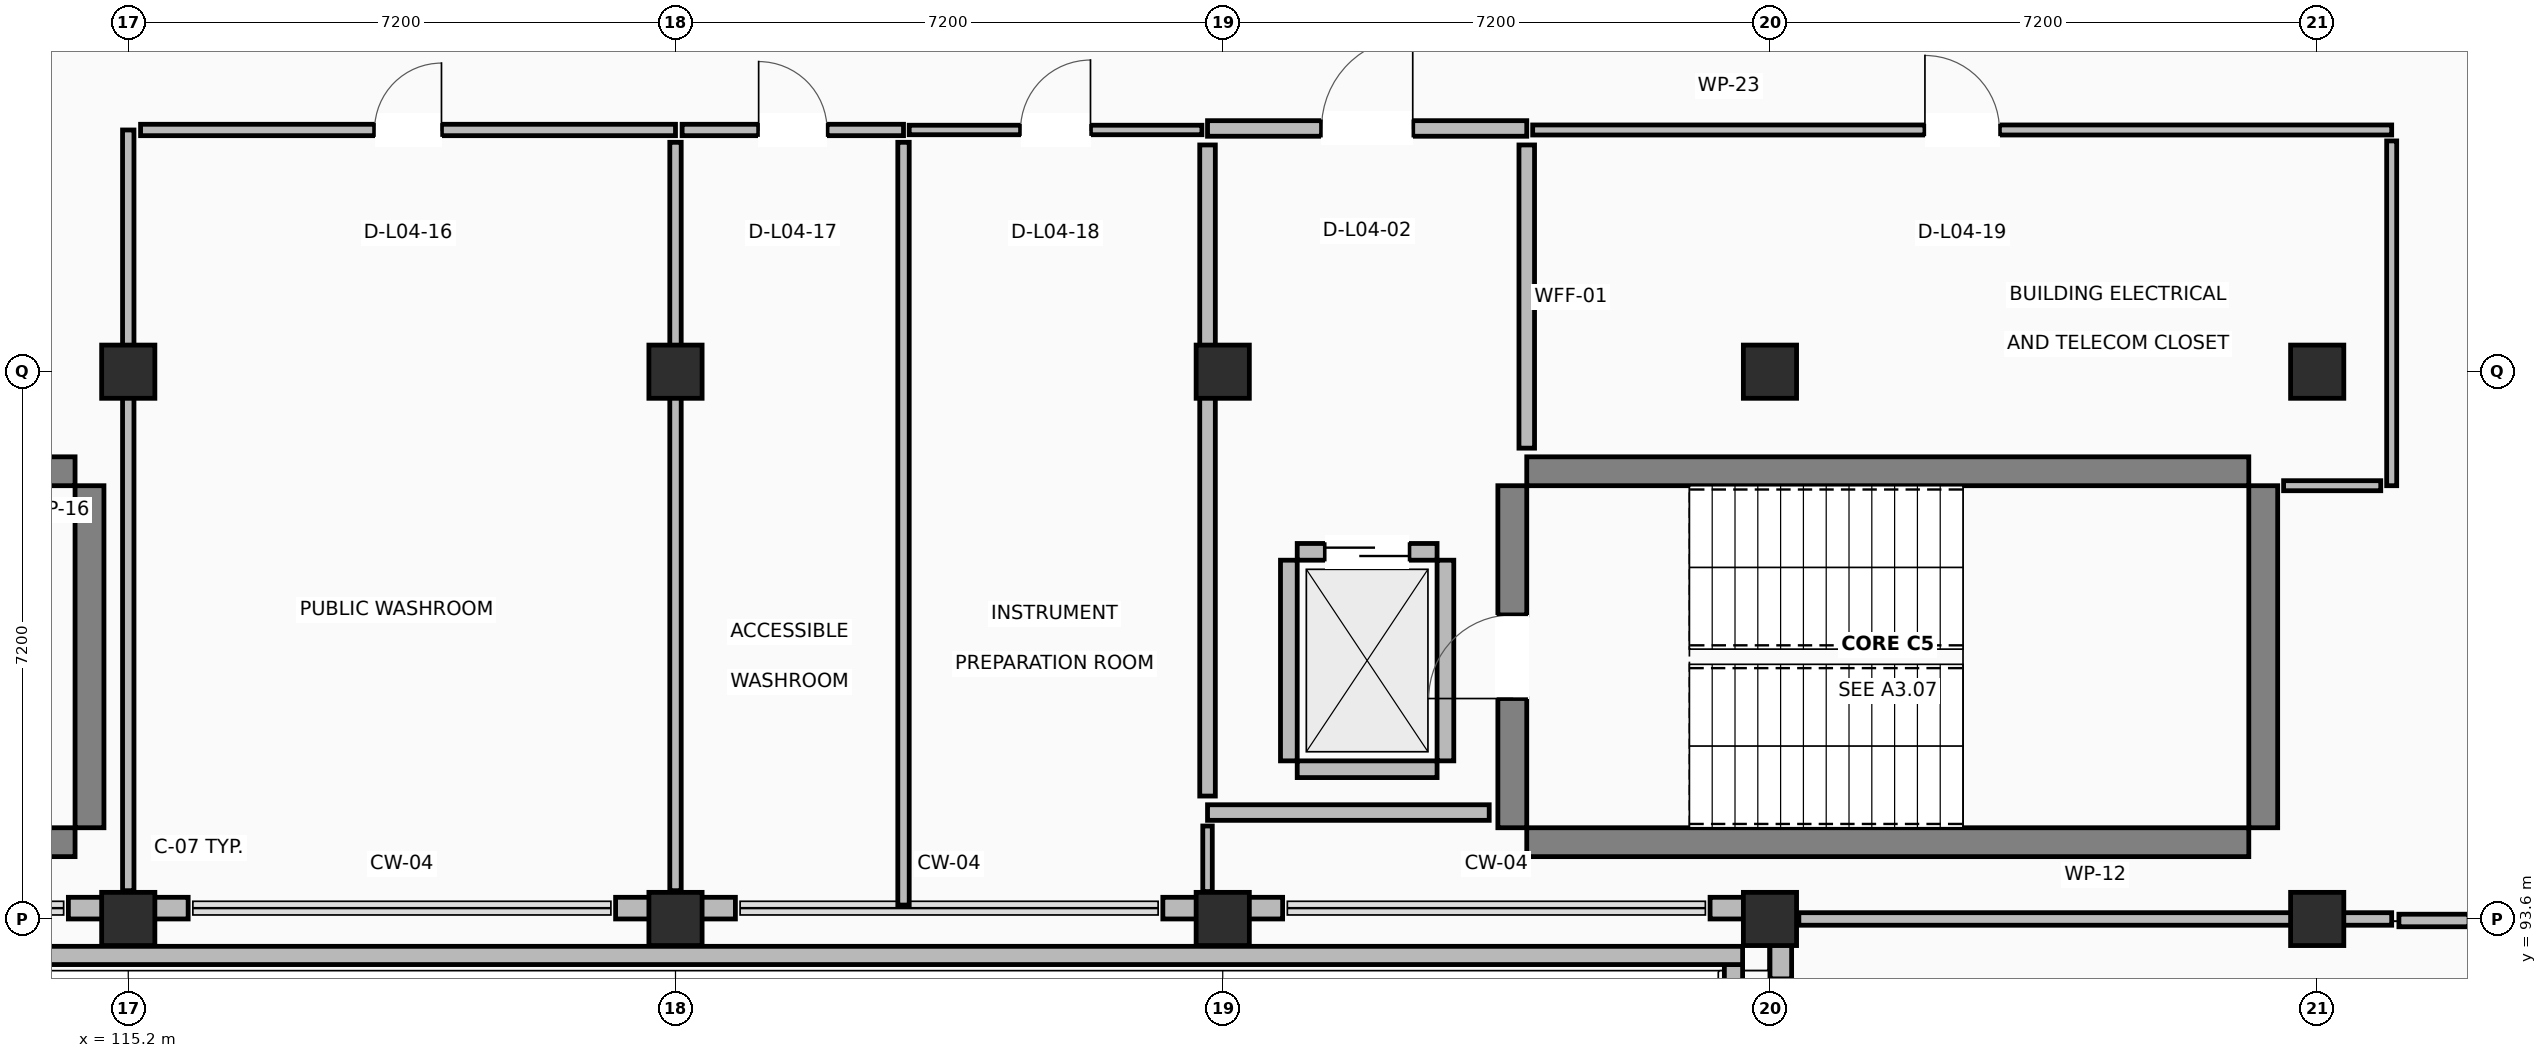
"""IFC4 building model, lengths in metres.
Left out: names, types, materials, properties, quantities, classifications, styles, units other than length and angle.
Written with IfcOpenShell. Run it as: python <this file> out.ifc"""

import sys

from ifc_helpers import new_model, si_unit, direction, frame, frame_2d, origin, origin_2d, place, context, subcontext, project, spatial, rectangle, extrude, element, fill, save


model = new_model("IFC4")
c1 = context("Model", 3, precision=1e-05, world=origin(), true_north=direction((0.0, 1.0)))
c2 = subcontext(c1, "Body", "Model", "MODEL_VIEW")
j1 = project(units=[si_unit("LENGTHUNIT", "METRE"), si_unit("PLANEANGLEUNIT", "RADIAN")], contexts=[c1])
p1 = place(None, origin())
s1 = spatial("IfcSite", under=j1, at=p1, CompositionType="ELEMENT")
p2 = place(p1, origin())
s2 = spatial("IfcBuilding", under=s1, at=p2, CompositionType="ELEMENT")
p3 = place(p2, frame((0.0, 0.0, 18.0)))
s3 = spatial("IfcBuildingStorey", under=s2, at=p3, CompositionType="ELEMENT", Elevation=18.0)
for number, where, z_axis, x_axis in (
    (1, (115.2, 93.6, 0.0), (0.0, 0.0, 1.0), (1.0, 0.0, 0.0)),
    (2, (115.2, 100.8, 0.0), (0.0, 0.0, 1.0), (1.0, 0.0, 0.0)),
    (3, (122.4, 93.6, 0.0), (0.0, 0.0, 1.0), (1.0, 0.0, 0.0)),
    (4, (122.4, 100.8, 0.0), (0.0, 0.0, 1.0), (1.0, 0.0, 0.0)),
    (5, (129.6, 93.6, 0.0), (0.0, 0.0, 1.0), (1.0, 0.0, 0.0)),
    (6, (129.6, 100.8, 0.0), (0.0, 0.0, 1.0), (1.0, 0.0, 0.0)),
    (7, (136.8, 93.6, 0.0), (0.0, 0.0, 1.0), (1.0, 0.0, 0.0)),
    (8, (136.8, 100.8, 0.0), (0.0, 0.0, 1.0), (1.0, 0.0, 0.0)),
    (9, (144.0, 93.6, 0.0), (0.0, 0.0, 1.0), (1.0, 0.0, 0.0)),
    (10, (144.0, 100.8, 0.0), (0.0, 0.0, 1.0), (1.0, 0.0, 0.0)),
):
    element("IfcColumn", number, at=place(p3, frame(where, z_axis=z_axis, x_axis=x_axis)), inside=s3, PredefinedType="COLUMN", context=c2, shape_type="SweptSolid", body=[
        extrude(rectangle(XDim=0.7, YDim=0.7, at=origin_2d()), origin(), (0.0, 0.0, 1.0), 4.22),
    ])
for number, where, z_axis, x_axis in (
    (11, (105.0, 94.61, 0.0), (0.0, 0.0, 1.0), (1.0, 0.0, 0.0)),
    (12, (105.0, 99.49, 0.0), (0.0, 0.0, 1.0), (1.0, 0.0, 0.0)),
):
    element("IfcWall", number, at=place(p3, frame(where, z_axis=z_axis, x_axis=x_axis)), inside=s3, PredefinedType="SHEAR", context=c2, shape_type="SweptSolid", body=[
        extrude(rectangle(XDim=9.5, YDim=0.38, at=frame_2d((4.75, 0.0))), origin(), (0.0, 0.0, 1.0), 4.22),
    ])
p4 = place(p3, frame((114.69, 94.8, 0.0), z_axis=(0.0, 0.0, 1.0), x_axis=(0.0, 1.0, 0.0)))
e13 = element("IfcWall", 13, at=p4, inside=s3, PredefinedType="SHEAR", context=c2, shape_type="SweptSolid", body=[
    extrude(rectangle(XDim=4.5, YDim=0.38, at=frame_2d((2.25, 0.0))), origin(), (0.0, 0.0, 1.0), 4.22),
])
for number, where, z_axis, x_axis in (
    (14, (133.6, 94.61, 0.0), (0.0, 0.0, 1.0), (1.0, 0.0, 0.0)),
    (15, (133.6, 99.49, 0.0), (0.0, 0.0, 1.0), (1.0, 0.0, 0.0)),
):
    element("IfcWall", number, at=place(p3, frame(where, z_axis=z_axis, x_axis=x_axis)), inside=s3, PredefinedType="SHEAR", context=c2, shape_type="SweptSolid", body=[
        extrude(rectangle(XDim=9.5, YDim=0.38, at=frame_2d((4.75, 0.0))), origin(), (0.0, 0.0, 1.0), 4.22),
    ])
p5 = place(p3, frame((133.41, 94.8, 0.0), z_axis=(0.0, 0.0, 1.0), x_axis=(0.0, 1.0, 0.0)))
e16 = element("IfcWall", 16, at=p5, inside=s3, PredefinedType="SHEAR", context=c2, shape_type="SweptSolid", body=[
    extrude(rectangle(XDim=4.5, YDim=0.38, at=frame_2d((2.25, 0.0))), origin(), (0.0, 0.0, 1.0), 4.22),
])
p6 = place(p5, frame((1.7, 0.0, 0.0)))
e17 = element("IfcOpeningElement", 17, at=p6, cuts=e16, PredefinedType="OPENING", context=c2, shape_type="SweptSolid", body=[
    extrude(rectangle(XDim=1.1, YDim=2.15, at=frame_2d((0.55, 1.075))), frame((0.0, 0.2, 0.0), z_axis=(0.0, -1.0, 0.0), x_axis=(1.0, 0.0, 0.0)), (0.0, 0.0, 1.0), 0.4),
])
p7 = place(p3, frame((143.29, 94.8, 0.0), z_axis=(0.0, 0.0, 1.0), x_axis=(0.0, 1.0, 0.0)))
e18 = element("IfcWall", 18, at=p7, inside=s3, PredefinedType="SHEAR", context=c2, shape_type="SweptSolid", body=[
    extrude(rectangle(XDim=4.5, YDim=0.38, at=frame_2d((2.25, 0.0))), origin(), (0.0, 0.0, 1.0), 4.22),
])
for number, where, z_axis, x_axis in (
    (19, (114.412, 93.742, 0.0), (0.0, 0.0, 1.0), (1.0, 0.0, 0.0)),
    (20, (121.612, 93.742, 0.0), (0.0, 0.0, 1.0), (1.0, 0.0, 0.0)),
    (21, (128.812, 93.742, 0.0), (0.0, 0.0, 1.0), (1.0, 0.0, 0.0)),
):
    element("IfcWall", number, at=place(p3, frame(where, z_axis=z_axis, x_axis=x_axis)), inside=s3, PredefinedType="STANDARD", context=c2, shape_type="SweptSolid", body=[
        extrude(rectangle(XDim=1.576, YDim=0.285, at=frame_2d((0.788, 0.0))), origin(), (0.0, 0.0, 1.0), 3.26),
    ])
p8 = place(p3, frame((136.012, 93.742, 0.0), z_axis=(0.0, 0.0, 1.0), x_axis=(1.0, 0.0, 0.0)))
e22 = element("IfcWall", 22, at=p8, inside=s3, PredefinedType="STANDARD", context=c2, shape_type="SweptSolid", body=[
    extrude(rectangle(XDim=0.788, YDim=0.285, at=frame_2d((0.394, 0.0))), origin(), (0.0, 0.0, 1.0), 3.26),
])
p9 = place(p3, frame((136.942, 93.885, 0.0), z_axis=(0.0, 0.0, 1.0), x_axis=(0.0, -1.0, 0.0)))
e23 = element("IfcWall", 23, at=p9, inside=s3, PredefinedType="STANDARD", context=c2, shape_type="SweptSolid", body=[
    extrude(rectangle(XDim=1.073, YDim=0.285, at=frame_2d((0.537, 0.0))), origin(), (0.0, 0.0, 1.0), 3.26),
])
p10 = place(p3, frame((136.32, 86.04, 0.0), z_axis=(0.0, 0.0, 1.0), x_axis=(0.0, 1.0, 0.0)))
e24 = element("IfcWall", 24, at=p10, inside=s3, PredefinedType="PARAPET", context=c2, shape_type="SweptSolid", body=[
    extrude(rectangle(XDim=6.96, YDim=0.24, at=frame_2d((3.48, 0.0))), origin(), (0.0, 0.0, 1.0), 1.12),
])
p11 = place(p3, frame((136.44, 93.12, 0.0), z_axis=(0.0, 0.0, 1.0), x_axis=(-1.0, 0.0, 0.0)))
e25 = element("IfcWall", 25, at=p11, inside=s3, PredefinedType="PARAPET", context=c2, shape_type="SweptSolid", body=[
    extrude(rectangle(XDim=57.84, YDim=0.24, at=frame_2d((28.92, 0.0))), origin(), (0.0, 0.0, 1.0), 1.12),
])
p12 = place(p3, frame((130.58, 95.57, 0.0), z_axis=(0.0, 0.0, 1.0), x_axis=(1.0, 0.0, 0.0)))
e26 = element("IfcWall", 26, at=p12, inside=s3, PredefinedType="STANDARD", context=c2, shape_type="SweptSolid", body=[
    extrude(rectangle(XDim=1.84, YDim=0.22, at=frame_2d((0.92, 0.0))), origin(), (0.0, 0.0, 1.0), 3.26),
])
p13 = place(p3, frame((130.58, 98.43, 0.0), z_axis=(0.0, 0.0, 1.0), x_axis=(1.0, 0.0, 0.0)))
e27 = element("IfcWall", 27, at=p13, inside=s3, PredefinedType="STANDARD", context=c2, shape_type="SweptSolid", body=[
    extrude(rectangle(XDim=1.84, YDim=0.22, at=frame_2d((0.92, 0.0))), origin(), (0.0, 0.0, 1.0), 3.26),
])
p14 = place(p13, frame((0.37, 0.0, 0.0)))
e28 = element("IfcOpeningElement", 28, at=p14, cuts=e27, PredefinedType="OPENING", context=c2, shape_type="SweptSolid", body=[
    extrude(rectangle(XDim=1.1, YDim=2.15, at=frame_2d((0.55, 1.075))), frame((0.0, 0.12, 0.0), z_axis=(0.0, -1.0, 0.0), x_axis=(1.0, 0.0, 0.0)), (0.0, 0.0, 1.0), 0.24),
])
for number, where, z_axis, x_axis in (
    (29, (130.47, 95.68, 0.0), (0.0, 0.0, 1.0), (0.0, 1.0, 0.0)),
    (30, (132.53, 95.68, 0.0), (0.0, 0.0, 1.0), (0.0, 1.0, 0.0)),
):
    element("IfcWall", number, at=place(p3, frame(where, z_axis=z_axis, x_axis=x_axis)), inside=s3, PredefinedType="STANDARD", context=c2, shape_type="SweptSolid", body=[
        extrude(rectangle(XDim=2.64, YDim=0.22, at=frame_2d((1.32, 0.0))), origin(), (0.0, 0.0, 1.0), 3.26),
    ])
p15 = place(p3, frame((129.4, 104.0, 0.0), z_axis=(0.0, 0.0, 1.0), x_axis=(1.0, 0.0, 0.0)))
e31 = element("IfcWall", 31, at=p15, inside=s3, PredefinedType="PARTITIONING", context=c2, shape_type="SweptSolid", body=[
    extrude(rectangle(XDim=4.2, YDim=0.205, at=frame_2d((2.1, 0.0))), origin(), (0.0, 0.0, 1.0), 3.26),
])
p16 = place(p15, frame((1.5, 0.0, 0.0)))
e32 = element("IfcOpeningElement", 32, at=p16, cuts=e31, PredefinedType="OPENING", context=c2, shape_type="SweptSolid", body=[
    extrude(rectangle(XDim=1.2, YDim=2.15, at=frame_2d((0.6, 1.075))), frame((0.0, 0.113, 0.0), z_axis=(0.0, -1.0, 0.0), x_axis=(1.0, 0.0, 0.0)), (0.0, 0.0, 1.0), 0.225),
])
p17 = place(p3, frame((133.6, 103.783, 0.0), z_axis=(0.0, 0.0, 1.0), x_axis=(0.0, -1.0, 0.0)))
e33 = element("IfcWall", 33, at=p17, inside=s3, PredefinedType="PARTITIONING", context=c2, shape_type="SweptSolid", body=[
    extrude(rectangle(XDim=3.989, YDim=0.205, at=frame_2d((1.995, 0.0))), origin(), (0.0, 0.0, 1.0), 3.26),
])
p18 = place(p3, frame((133.106, 95.0, 0.0), z_axis=(0.0, 0.0, 1.0), x_axis=(-1.0, 0.0, 0.0)))
e34 = element("IfcWall", 34, at=p18, inside=s3, PredefinedType="PARTITIONING", context=c2, shape_type="SweptSolid", body=[
    extrude(rectangle(XDim=3.706, YDim=0.205, at=frame_2d((1.853, 0.0))), origin(), (0.0, 0.0, 1.0), 3.26),
])
p19 = place(p3, frame((129.4, 95.217, 0.0), z_axis=(0.0, 0.0, 1.0), x_axis=(0.0, 1.0, 0.0)))
e35 = element("IfcWall", 35, at=p19, inside=s3, PredefinedType="PARTITIONING", context=c2, shape_type="SweptSolid", body=[
    extrude(rectangle(XDim=8.566, YDim=0.205, at=frame_2d((4.283, 0.0))), origin(), (0.0, 0.0, 1.0), 3.26),
])
p20 = place(p3, frame((137.18, 93.6, 0.0), z_axis=(0.0, 0.0, 1.0), x_axis=(1.0, 0.0, 0.0)))
e36 = element("IfcWall", 36, at=p20, inside=s3, PredefinedType="PARTITIONING", context=c2, shape_type="SweptSolid", body=[
    extrude(rectangle(XDim=7.8, YDim=0.165, at=frame_2d((3.9, 0.0))), origin(), (0.0, 0.0, 1.0), 3.26),
])
p21 = place(p3, frame((145.075, 93.58, 0.0), z_axis=(0.0, 0.0, 1.0), x_axis=(1.0, 0.0, 0.0)))
e37 = element("IfcWall", 37, at=p21, inside=s3, PredefinedType="PARTITIONING", context=c2, shape_type="SweptSolid", body=[
    extrude(rectangle(XDim=2.925, YDim=0.165, at=frame_2d((1.462, 0.0))), origin(), (0.0, 0.0, 1.0), 3.26),
])
p22 = place(p21, frame((0.923, 0.0, 0.0)))
e38 = element("IfcOpeningElement", 38, at=p22, cuts=e37, PredefinedType="OPENING", context=c2, shape_type="SweptSolid", body=[
    extrude(rectangle(XDim=1.08, YDim=2.15, at=frame_2d((0.54, 1.075))), frame((0.0, 0.093, 0.0), z_axis=(0.0, -1.0, 0.0), x_axis=(1.0, 0.0, 0.0)), (0.0, 0.0, 1.0), 0.185),
])
p23 = place(p3, frame((115.2, 93.972, 0.0), z_axis=(0.0, 0.0, 1.0), x_axis=(0.0, 1.0, 0.0)))
e39 = element("IfcWall", 39, at=p23, inside=s3, PredefinedType="PARTITIONING", context=c2, shape_type="SweptSolid", body=[
    extrude(rectangle(XDim=10.008, YDim=0.15, at=frame_2d((5.004, 0.0))), origin(), (0.0, 0.0, 1.0), 3.26),
])
p24 = place(p3, frame((115.362, 103.98, 0.0), z_axis=(0.0, 0.0, 1.0), x_axis=(1.0, 0.0, 0.0)))
e40 = element("IfcWall", 40, at=p24, inside=s3, PredefinedType="PARTITIONING", context=c2, shape_type="SweptSolid", body=[
    extrude(rectangle(XDim=7.038, YDim=0.15, at=frame_2d((3.519, 0.0))), origin(), (0.0, 0.0, 1.0), 3.26),
])
p25 = place(p24, frame((3.079, 0.0, 0.0)))
e41 = element("IfcOpeningElement", 41, at=p25, cuts=e40, PredefinedType="OPENING", context=c2, shape_type="SweptSolid", body=[
    extrude(rectangle(XDim=0.88, YDim=2.1, at=frame_2d((0.44, 1.05))), frame((0.0, 0.085, 0.0), z_axis=(0.0, -1.0, 0.0), x_axis=(1.0, 0.0, 0.0)), (0.0, 0.0, 1.0), 0.17),
])
p26 = place(p3, frame((122.4, 103.818, 0.0), z_axis=(0.0, 0.0, 1.0), x_axis=(0.0, -1.0, 0.0)))
e42 = element("IfcWall", 42, at=p26, inside=s3, PredefinedType="PARTITIONING", context=c2, shape_type="SweptSolid", body=[
    extrude(rectangle(XDim=9.846, YDim=0.15, at=frame_2d((4.923, 0.0))), origin(), (0.0, 0.0, 1.0), 3.26),
])
p27 = place(p3, frame((122.487, 103.98, 0.0), z_axis=(0.0, 0.0, 1.0), x_axis=(1.0, 0.0, 0.0)))
e43 = element("IfcWall", 43, at=p27, inside=s3, PredefinedType="PARTITIONING", context=c2, shape_type="SweptSolid", body=[
    extrude(rectangle(XDim=2.913, YDim=0.15, at=frame_2d((1.457, 0.0))), origin(), (0.0, 0.0, 1.0), 3.26),
])
p28 = place(p27, frame((1.007, 0.0, 0.0)))
e44 = element("IfcOpeningElement", 44, at=p28, cuts=e43, PredefinedType="OPENING", context=c2, shape_type="SweptSolid", body=[
    extrude(rectangle(XDim=0.9, YDim=2.1, at=frame_2d((0.45, 1.05))), frame((0.0, 0.085, 0.0), z_axis=(0.0, -1.0, 0.0), x_axis=(1.0, 0.0, 0.0)), (0.0, 0.0, 1.0), 0.17),
])
p29 = place(p3, frame((125.4, 103.818, 0.0), z_axis=(0.0, 0.0, 1.0), x_axis=(0.0, -1.0, 0.0)))
e45 = element("IfcWall", 45, at=p29, inside=s3, PredefinedType="PARTITIONING", context=c2, shape_type="SweptSolid", body=[
    extrude(rectangle(XDim=10.035, YDim=0.15, at=frame_2d((5.018, 0.0))), origin(), (0.0, 0.0, 1.0), 3.26),
])
p30 = place(p3, frame((125.475, 103.98, 0.0), z_axis=(0.0, 0.0, 1.0), x_axis=(1.0, 0.0, 0.0)))
e46 = element("IfcWall", 46, at=p30, inside=s3, PredefinedType="PARTITIONING", context=c2, shape_type="SweptSolid", body=[
    extrude(rectangle(XDim=3.851, YDim=0.125, at=frame_2d((1.925, 0.0))), origin(), (0.0, 0.0, 1.0), 3.26),
])
p31 = place(p30, frame((1.465, 0.0, 0.0)))
e47 = element("IfcOpeningElement", 47, at=p31, cuts=e46, PredefinedType="OPENING", context=c2, shape_type="SweptSolid", body=[
    extrude(rectangle(XDim=0.92, YDim=2.1, at=frame_2d((0.46, 1.05))), frame((0.0, 0.073, 0.0), z_axis=(0.0, -1.0, 0.0), x_axis=(1.0, 0.0, 0.0)), (0.0, 0.0, 1.0), 0.145),
])
p32 = place(p3, frame((129.4, 94.823, 0.0), z_axis=(0.0, 0.0, 1.0), x_axis=(0.0, -1.0, 0.0)))
e48 = element("IfcWall", 48, at=p32, inside=s3, PredefinedType="PARTITIONING", context=c2, shape_type="SweptSolid", body=[
    extrude(rectangle(XDim=0.863, YDim=0.125, at=frame_2d((0.432, 0.0))), origin(), (0.0, 0.0, 1.0), 3.26),
])
p33 = place(p3, frame((133.678, 103.98, 0.0), z_axis=(0.0, 0.0, 1.0), x_axis=(1.0, 0.0, 0.0)))
e49 = element("IfcWall", 49, at=p33, inside=s3, PredefinedType="PARTITIONING", context=c2, shape_type="SweptSolid", body=[
    extrude(rectangle(XDim=11.302, YDim=0.132, at=frame_2d((5.651, 0.0))), origin(), (0.0, 0.0, 1.0), 3.26),
])
p34 = place(p33, frame((5.161, 0.0, 0.0)))
e50 = element("IfcOpeningElement", 50, at=p34, cuts=e49, PredefinedType="OPENING", context=c2, shape_type="SweptSolid", body=[
    extrude(rectangle(XDim=0.98, YDim=2.1, at=frame_2d((0.49, 1.05))), frame((0.0, 0.076, 0.0), z_axis=(0.0, -1.0, 0.0), x_axis=(1.0, 0.0, 0.0)), (0.0, 0.0, 1.0), 0.152),
])
p35 = place(p3, frame((144.98, 103.836, 0.0), z_axis=(0.0, 0.0, 1.0), x_axis=(0.0, -1.0, 0.0)))
e51 = element("IfcWall", 51, at=p35, inside=s3, PredefinedType="PARTITIONING", context=c2, shape_type="SweptSolid", body=[
    extrude(rectangle(XDim=4.536, YDim=0.132, at=frame_2d((2.268, 0.0))), origin(), (0.0, 0.0, 1.0), 3.26),
])
p36 = place(p3, frame((144.836, 99.3, 0.0), z_axis=(0.0, 0.0, 1.0), x_axis=(-1.0, 0.0, 0.0)))
e52 = element("IfcWall", 52, at=p36, inside=s3, PredefinedType="PARTITIONING", context=c2, shape_type="SweptSolid", body=[
    extrude(rectangle(XDim=1.278, YDim=0.132, at=frame_2d((0.639, 0.0))), origin(), (0.0, 0.0, 1.0), 3.26),
])
p37 = place(p6, origin())
e53 = element("IfcDoor", 53, at=p37, inside=s3, OperationType="SINGLE_SWING_LEFT", PredefinedType="DOOR", context=c2, shape_type="SweptSolid", body=[
    extrude(rectangle(XDim=1.1, YDim=2.15, at=frame_2d((0.55, 1.075))), frame((0.0, 0.025, 0.0), z_axis=(0.0, -1.0, 0.0), x_axis=(1.0, 0.0, 0.0)), (0.0, 0.0, 1.0), 0.05),
])
fill(e17, e53)
p38 = place(p14, origin())
e54 = element("IfcDoor", 54, at=p38, inside=s3, OperationType="SLIDING_TO_LEFT", PredefinedType="DOOR", context=c2, shape_type="SweptSolid", body=[
    extrude(rectangle(XDim=1.1, YDim=2.15, at=frame_2d((0.55, 1.075))), frame((0.0, 0.025, 0.0), z_axis=(0.0, -1.0, 0.0), x_axis=(1.0, 0.0, 0.0)), (0.0, 0.0, 1.0), 0.05),
])
fill(e28, e54)
p39 = place(p16, origin())
e55 = element("IfcDoor", 55, at=p39, inside=s3, OperationType="SINGLE_SWING_RIGHT", PredefinedType="DOOR", context=c2, shape_type="SweptSolid", body=[
    extrude(rectangle(XDim=1.2, YDim=2.15, at=frame_2d((0.6, 1.075))), frame((0.0, 0.025, 0.0), z_axis=(0.0, -1.0, 0.0), x_axis=(1.0, 0.0, 0.0)), (0.0, 0.0, 1.0), 0.05),
])
fill(e32, e55)
p40 = place(p25, origin())
e56 = element("IfcDoor", 56, at=p40, inside=s3, OperationType="SINGLE_SWING_RIGHT", PredefinedType="DOOR", context=c2, shape_type="SweptSolid", body=[
    extrude(rectangle(XDim=0.88, YDim=2.1, at=frame_2d((0.44, 1.05))), frame((0.0, 0.025, 0.0), z_axis=(0.0, -1.0, 0.0), x_axis=(1.0, 0.0, 0.0)), (0.0, 0.0, 1.0), 0.05),
])
fill(e41, e56)
p41 = place(p28, origin())
e57 = element("IfcDoor", 57, at=p41, inside=s3, OperationType="SINGLE_SWING_LEFT", PredefinedType="DOOR", context=c2, shape_type="SweptSolid", body=[
    extrude(rectangle(XDim=0.9, YDim=2.1, at=frame_2d((0.45, 1.05))), frame((0.0, 0.025, 0.0), z_axis=(0.0, -1.0, 0.0), x_axis=(1.0, 0.0, 0.0)), (0.0, 0.0, 1.0), 0.05),
])
fill(e44, e57)
p42 = place(p31, origin())
e58 = element("IfcDoor", 58, at=p42, inside=s3, OperationType="SINGLE_SWING_RIGHT", PredefinedType="DOOR", context=c2, shape_type="SweptSolid", body=[
    extrude(rectangle(XDim=0.92, YDim=2.1, at=frame_2d((0.46, 1.05))), frame((0.0, 0.025, 0.0), z_axis=(0.0, -1.0, 0.0), x_axis=(1.0, 0.0, 0.0)), (0.0, 0.0, 1.0), 0.05),
])
fill(e47, e58)
p43 = place(p34, origin())
e59 = element("IfcDoor", 59, at=p43, inside=s3, OperationType="SINGLE_SWING_LEFT", PredefinedType="DOOR", context=c2, shape_type="SweptSolid", body=[
    extrude(rectangle(XDim=0.98, YDim=2.1, at=frame_2d((0.49, 1.05))), frame((0.0, 0.025, 0.0), z_axis=(0.0, -1.0, 0.0), x_axis=(1.0, 0.0, 0.0)), (0.0, 0.0, 1.0), 0.05),
])
fill(e50, e59)
save(model, sys.argv[1])
